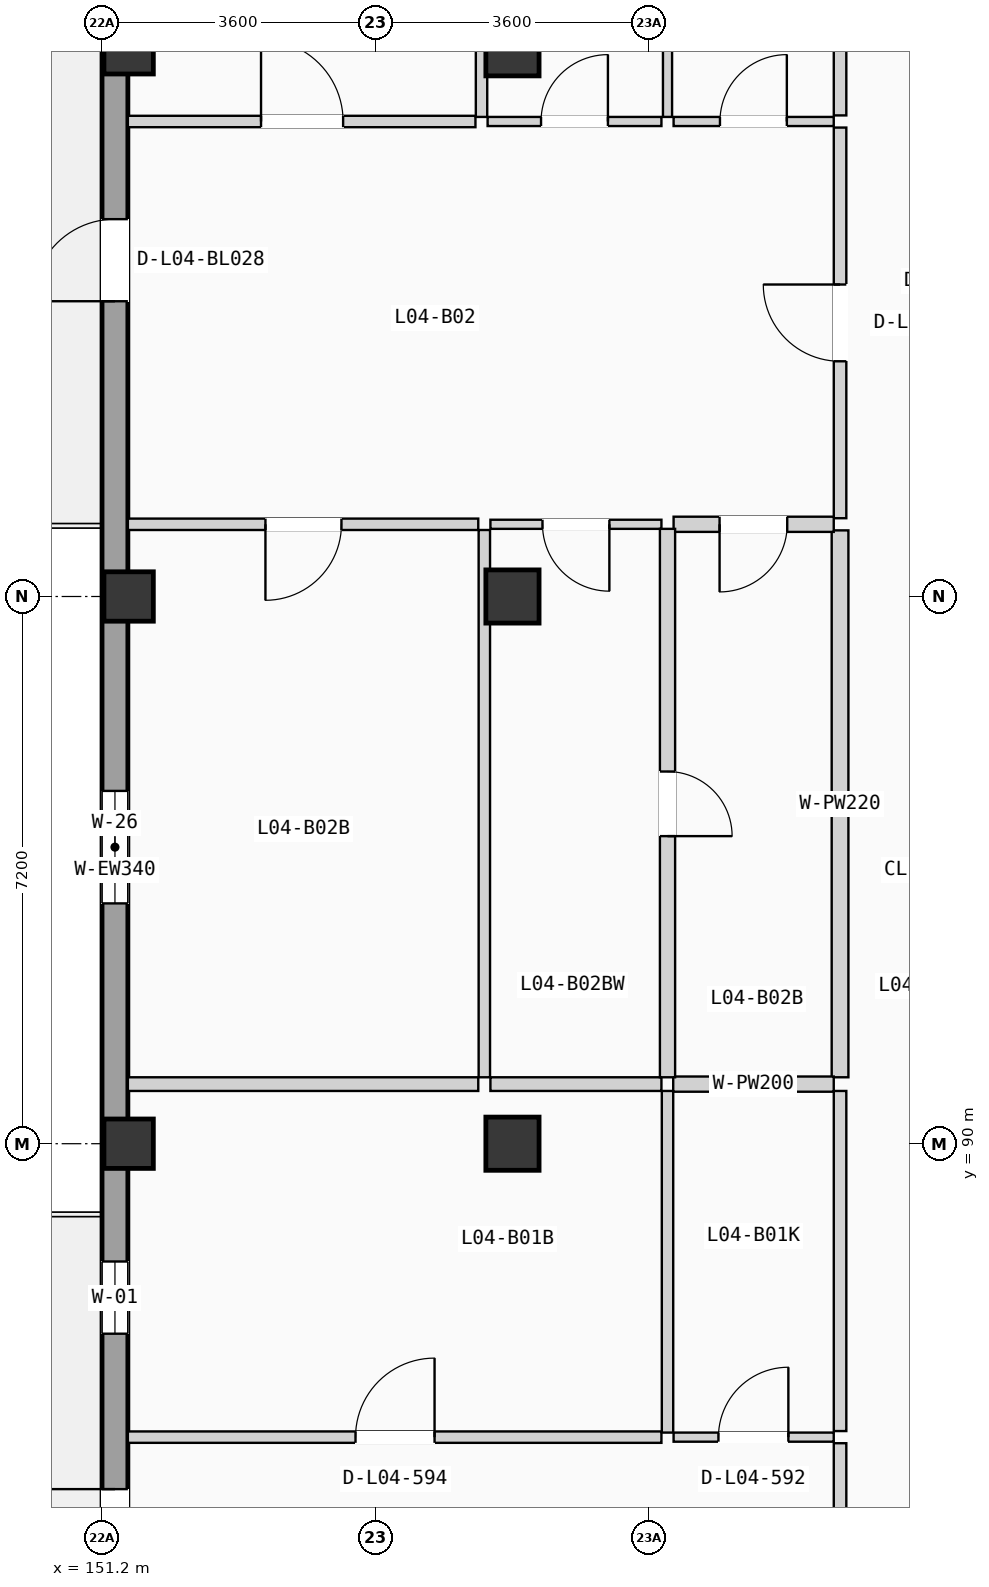
"""IFC4 building model, lengths in metres.
Left out: names, types, materials, properties, quantities, classifications, styles, units other than length and angle.
Written with IfcOpenShell. Run it as: python <this file> out.ifc"""

import sys

from ifc_helpers import new_model, si_unit, direction, frame, frame_2d, origin, origin_2d, place, context, subcontext, project, spatial, rectangle, extrude, element, fill, save


model = new_model("IFC4")
c1 = context("Model", 3, precision=1e-05, world=origin(), true_north=direction((0.0, 1.0)))
c2 = subcontext(c1, "Body", "Model", "MODEL_VIEW")
j1 = project(units=[si_unit("LENGTHUNIT", "METRE"), si_unit("PLANEANGLEUNIT", "RADIAN")], contexts=[c1])
p1 = place(None, origin())
s1 = spatial("IfcSite", under=j1, at=p1, CompositionType="ELEMENT")
p2 = place(p1, origin())
s2 = spatial("IfcBuilding", under=s1, at=p2, CompositionType="ELEMENT")
p3 = place(p2, frame((0.0, 0.0, 15.225)))
s3 = spatial("IfcBuildingStorey", under=s2, at=p3, CompositionType="ELEMENT", Elevation=15.225)
for number, where, z_axis, x_axis in (
    (1, (151.55, 90.0, 0.0), (0.0, 0.0, 1.0), (1.0, 0.0, 0.0)),
    (2, (151.55, 97.2, 0.0), (0.0, 0.0, 1.0), (1.0, 0.0, 0.0)),
    (3, (151.55, 104.4, 0.0), (0.0, 0.0, 1.0), (1.0, 0.0, 0.0)),
):
    element("IfcColumn", number, at=place(p3, frame(where, z_axis=z_axis, x_axis=x_axis)), inside=s3, PredefinedType="COLUMN", context=c2, shape_type="SweptSolid", body=[
        extrude(rectangle(XDim=0.65, YDim=0.65, at=origin_2d()), origin(), (0.0, 0.0, 1.0), 3.15),
    ])
for number, where, z_axis, x_axis in (
    (4, (156.6, 90.0, 0.0), (0.0, 0.0, 1.0), (1.0, 0.0, 0.0)),
    (5, (156.6, 97.2, 0.0), (0.0, 0.0, 1.0), (1.0, 0.0, 0.0)),
    (6, (156.6, 104.4, 0.0), (0.0, 0.0, 1.0), (1.0, 0.0, 0.0)),
):
    element("IfcColumn", number, at=place(p3, frame(where, z_axis=z_axis, x_axis=x_axis)), inside=s3, PredefinedType="COLUMN", context=c2, shape_type="SweptSolid", body=[
        extrude(rectangle(XDim=0.7, YDim=0.7, at=origin_2d()), origin(), (0.0, 0.0, 1.0), 3.15),
    ])
p4 = place(p3, frame((151.37, 68.74, 0.0), z_axis=(0.0, 0.0, 1.0), x_axis=(0.0, 1.0, 0.0)))
e7 = element("IfcWall", 7, at=p4, inside=s3, PredefinedType="SOLIDWALL", context=c2, shape_type="SweptSolid", body=[
    extrude(rectangle(XDim=49.72, YDim=0.34, at=frame_2d((24.86, 0.0))), origin(), (0.0, 0.0, 1.0), 2.89),
])
p5 = place(p4, frame((15.765, 0.0, 0.0)))
e8 = element("IfcOpeningElement", 8, at=p5, cuts=e7, PredefinedType="OPENING", context=c2, shape_type="SweptSolid", body=[
    extrude(rectangle(XDim=0.95, YDim=2.15, at=frame_2d((0.475, 1.075))), frame((0.0, 0.18, 0.0), z_axis=(0.0, -1.0, 0.0), x_axis=(1.0, 0.0, 0.0)), (0.0, 0.0, 1.0), 0.36),
])
p6 = place(p4, frame((8.823, 0.0, 0.555)))
e9 = element("IfcOpeningElement", 9, at=p6, cuts=e7, PredefinedType="OPENING", context=c2, shape_type="SweptSolid", body=[
    extrude(rectangle(XDim=1.35, YDim=1.65, at=frame_2d((0.675, 0.825))), frame((0.0, 0.18, 0.0), z_axis=(0.0, -1.0, 0.0), x_axis=(1.0, 0.0, 0.0)), (0.0, 0.0, 1.0), 0.36),
])
p7 = place(p4, frame((18.76, 0.0, 0.85)))
e10 = element("IfcOpeningElement", 10, at=p7, cuts=e7, PredefinedType="OPENING", context=c2, shape_type="SweptSolid", body=[
    extrude(rectangle(XDim=0.95, YDim=1.2, at=frame_2d((0.475, 0.6))), frame((0.0, 0.18, 0.0), z_axis=(0.0, -1.0, 0.0), x_axis=(1.0, 0.0, 0.0)), (0.0, 0.0, 1.0), 0.36),
])
p8 = place(p4, frame((32.345, 0.0, 0.0)))
e11 = element("IfcOpeningElement", 11, at=p8, cuts=e7, PredefinedType="OPENING", context=c2, shape_type="SweptSolid", body=[
    extrude(rectangle(XDim=1.08, YDim=2.18, at=frame_2d((0.54, 1.09))), frame((0.0, 0.18, 0.0), z_axis=(0.0, -1.0, 0.0), x_axis=(1.0, 0.0, 0.0)), (0.0, 0.0, 1.0), 0.36),
])
p9 = place(p4, frame((24.422, 0.0, 0.9)))
e12 = element("IfcOpeningElement", 12, at=p9, cuts=e7, PredefinedType="OPENING", context=c2, shape_type="SweptSolid", body=[
    extrude(rectangle(XDim=1.48, YDim=1.2, at=frame_2d((0.74, 0.6))), frame((0.0, 0.18, 0.0), z_axis=(0.0, -1.0, 0.0), x_axis=(1.0, 0.0, 0.0)), (0.0, 0.0, 1.0), 0.36),
])
p10 = place(p4, frame((38.455, 0.0, 0.855)))
e13 = element("IfcOpeningElement", 13, at=p10, cuts=e7, PredefinedType="OPENING", context=c2, shape_type="SweptSolid", body=[
    extrude(rectangle(XDim=1.48, YDim=1.35, at=frame_2d((0.74, 0.675))), frame((0.0, 0.18, 0.0), z_axis=(0.0, -1.0, 0.0), x_axis=(1.0, 0.0, 0.0)), (0.0, 0.0, 1.0), 0.36),
])
p11 = place(p3, frame((160.91, 80.635, 0.0), z_axis=(0.0, 0.0, 1.0), x_axis=(0.0, 1.0, 0.0)))
e14 = element("IfcWall", 14, at=p11, inside=s3, PredefinedType="PARTITIONING", context=c2, shape_type="SweptSolid", body=[
    extrude(rectangle(XDim=5.424, YDim=0.165, at=frame_2d((2.712, 0.0))), origin(), (0.0, 0.0, 1.0), 2.87),
])
p12 = place(p11, frame((2.207, 0.0, 0.0)))
e15 = element("IfcOpeningElement", 15, at=p12, cuts=e14, PredefinedType="OPENING", context=c2, shape_type="SweptSolid", body=[
    extrude(rectangle(XDim=1.01, YDim=2.11, at=frame_2d((0.505, 1.055))), frame((0.0, 0.093, 0.0), z_axis=(0.0, -1.0, 0.0), x_axis=(1.0, 0.0, 0.0)), (0.0, 0.0, 1.0), 0.185),
])
p13 = place(p3, frame((160.91, 86.219, 0.0), z_axis=(0.0, 0.0, 1.0), x_axis=(0.0, 1.0, 0.0)))
e16 = element("IfcWall", 16, at=p13, inside=s3, PredefinedType="PARTITIONING", context=c2, shape_type="SweptSolid", body=[
    extrude(rectangle(XDim=4.475, YDim=0.165, at=frame_2d((2.238, 0.0))), origin(), (0.0, 0.0, 1.0), 2.87),
])
p14 = place(p3, frame((160.91, 98.23, 0.0), z_axis=(0.0, 0.0, 1.0), x_axis=(0.0, 1.0, 0.0)))
e17 = element("IfcWall", 17, at=p14, inside=s3, PredefinedType="PARTITIONING", context=c2, shape_type="SweptSolid", body=[
    extrude(rectangle(XDim=5.14, YDim=0.165, at=frame_2d((2.57, 0.0))), origin(), (0.0, 0.0, 1.0), 2.87),
])
p15 = place(p14, frame((2.065, 0.0, 0.0)))
e18 = element("IfcOpeningElement", 18, at=p15, cuts=e17, PredefinedType="OPENING", context=c2, shape_type="SweptSolid", body=[
    extrude(rectangle(XDim=1.01, YDim=2.11, at=frame_2d((0.505, 1.055))), frame((0.0, 0.093, 0.0), z_axis=(0.0, -1.0, 0.0), x_axis=(1.0, 0.0, 0.0)), (0.0, 0.0, 1.0), 0.185),
])
p16 = place(p3, frame((160.91, 90.874, 0.0), z_axis=(0.0, 0.0, 1.0), x_axis=(0.0, 1.0, 0.0)))
e19 = element("IfcWall", 19, at=p16, inside=s3, PredefinedType="PLUMBINGWALL", context=c2, shape_type="SweptSolid", body=[
    extrude(rectangle(XDim=7.196, YDim=0.22, at=frame_2d((3.598, 0.0))), origin(), (0.0, 0.0, 1.0), 2.87),
])
p17 = place(p3, frame((160.91, 103.53, 0.0), z_axis=(0.0, 0.0, 1.0), x_axis=(0.0, 1.0, 0.0)))
e20 = element("IfcWall", 20, at=p17, inside=s3, PredefinedType="PARTITIONING", context=c2, shape_type="SweptSolid", body=[
    extrude(rectangle(XDim=7.67, YDim=0.165, at=frame_2d((3.835, 0.0))), origin(), (0.0, 0.0, 1.0), 2.87),
])
p18 = place(p3, frame((158.72, 86.139, 0.0), z_axis=(0.0, 0.0, 1.0), x_axis=(1.0, 0.0, 0.0)))
e21 = element("IfcWall", 21, at=p18, inside=s3, PredefinedType="PARTITIONING", context=c2, shape_type="SweptSolid", body=[
    extrude(rectangle(XDim=2.107, YDim=0.12, at=frame_2d((1.053, 0.0))), origin(), (0.0, 0.0, 1.0), 2.87),
])
p19 = place(p18, frame((0.59, 0.0, 0.0)))
e22 = element("IfcOpeningElement", 22, at=p19, cuts=e21, PredefinedType="OPENING", context=c2, shape_type="SweptSolid", body=[
    extrude(rectangle(XDim=0.92, YDim=2.02, at=frame_2d((0.46, 1.01))), frame((0.0, 0.07, 0.0), z_axis=(0.0, -1.0, 0.0), x_axis=(1.0, 0.0, 0.0)), (0.0, 0.0, 1.0), 0.14),
])
p20 = place(p3, frame((151.54, 86.139, 0.0), z_axis=(0.0, 0.0, 1.0), x_axis=(1.0, 0.0, 0.0)))
e23 = element("IfcWall", 23, at=p20, inside=s3, PredefinedType="PARTITIONING", context=c2, shape_type="SweptSolid", body=[
    extrude(rectangle(XDim=7.02, YDim=0.15, at=frame_2d((3.51, 0.0))), origin(), (0.0, 0.0, 1.0), 2.87),
])
p21 = place(p20, frame((2.995, 0.0, 0.0)))
e24 = element("IfcOpeningElement", 24, at=p21, cuts=e23, PredefinedType="OPENING", context=c2, shape_type="SweptSolid", body=[
    extrude(rectangle(XDim=1.04, YDim=2.08, at=frame_2d((0.52, 1.04))), frame((0.0, 0.085, 0.0), z_axis=(0.0, -1.0, 0.0), x_axis=(1.0, 0.0, 0.0)), (0.0, 0.0, 1.0), 0.17),
])
p22 = place(p3, frame((158.64, 86.199, 0.0), z_axis=(0.0, 0.0, 1.0), x_axis=(0.0, 1.0, 0.0)))
e25 = element("IfcWall", 25, at=p22, inside=s3, PredefinedType="PARTITIONING", context=c2, shape_type="SweptSolid", body=[
    extrude(rectangle(XDim=4.495, YDim=0.15, at=frame_2d((2.248, 0.0))), origin(), (0.0, 0.0, 1.0), 2.87),
])
p23 = place(p3, frame((158.715, 90.784, 0.0), z_axis=(0.0, 0.0, 1.0), x_axis=(1.0, 0.0, 0.0)))
e26 = element("IfcWall", 26, at=p23, inside=s3, PredefinedType="PLUMBINGWALL", context=c2, shape_type="SweptSolid", body=[
    extrude(rectangle(XDim=2.112, YDim=0.2, at=frame_2d((1.056, 0.0))), origin(), (0.0, 0.0, 1.0), 2.87),
])
p24 = place(p3, frame((151.54, 90.784, 0.0), z_axis=(0.0, 0.0, 1.0), x_axis=(1.0, 0.0, 0.0)))
e27 = element("IfcWall", 27, at=p24, inside=s3, PredefinedType="PARTITIONING", context=c2, shape_type="SweptSolid", body=[
    extrude(rectangle(XDim=4.61, YDim=0.18, at=frame_2d((2.305, 0.0))), origin(), (0.0, 0.0, 1.0), 2.87),
])
p25 = place(p3, frame((156.31, 90.784, 0.0), z_axis=(0.0, 0.0, 1.0), x_axis=(1.0, 0.0, 0.0)))
e28 = element("IfcWall", 28, at=p25, inside=s3, PredefinedType="PARTITIONING", context=c2, shape_type="SweptSolid", body=[
    extrude(rectangle(XDim=2.25, YDim=0.18, at=frame_2d((1.125, 0.0))), origin(), (0.0, 0.0, 1.0), 2.87),
])
p26 = place(p3, frame((158.72, 98.15, 0.0), z_axis=(0.0, 0.0, 1.0), x_axis=(1.0, 0.0, 0.0)))
e29 = element("IfcWall", 29, at=p26, inside=s3, PredefinedType="PLUMBINGWALL", context=c2, shape_type="SweptSolid", body=[
    extrude(rectangle(XDim=2.107, YDim=0.2, at=frame_2d((1.053, 0.0))), origin(), (0.0, 0.0, 1.0), 2.87),
])
p27 = place(p26, frame((0.605, 0.0, 0.0)))
e30 = element("IfcOpeningElement", 30, at=p27, cuts=e29, PredefinedType="OPENING", context=c2, shape_type="SweptSolid", body=[
    extrude(rectangle(XDim=0.89, YDim=2.03, at=frame_2d((0.445, 1.015))), frame((0.0, 0.11, 0.0), z_axis=(0.0, -1.0, 0.0), x_axis=(1.0, 0.0, 0.0)), (0.0, 0.0, 1.0), 0.22),
])
p28 = place(p3, frame((158.72, 103.45, 0.0), z_axis=(0.0, 0.0, 1.0), x_axis=(1.0, 0.0, 0.0)))
e31 = element("IfcWall", 31, at=p28, inside=s3, PredefinedType="PARTITIONING", context=c2, shape_type="SweptSolid", body=[
    extrude(rectangle(XDim=2.107, YDim=0.12, at=frame_2d((1.053, 0.0))), origin(), (0.0, 0.0, 1.0), 2.87),
])
p29 = place(p28, frame((0.61, 0.0, 0.0)))
e32 = element("IfcOpeningElement", 32, at=p29, cuts=e31, PredefinedType="OPENING", context=c2, shape_type="SweptSolid", body=[
    extrude(rectangle(XDim=0.88, YDim=2.02, at=frame_2d((0.44, 1.01))), frame((0.0, 0.07, 0.0), z_axis=(0.0, -1.0, 0.0), x_axis=(1.0, 0.0, 0.0)), (0.0, 0.0, 1.0), 0.14),
])
p30 = place(p3, frame((151.54, 98.15, 0.0), z_axis=(0.0, 0.0, 1.0), x_axis=(1.0, 0.0, 0.0)))
e33 = element("IfcWall", 33, at=p30, inside=s3, PredefinedType="PARTITIONING", context=c2, shape_type="SweptSolid", body=[
    extrude(rectangle(XDim=4.61, YDim=0.15, at=frame_2d((2.305, 0.0))), origin(), (0.0, 0.0, 1.0), 2.87),
])
p31 = place(p30, frame((1.81, 0.0, 0.0)))
e34 = element("IfcOpeningElement", 34, at=p31, cuts=e33, PredefinedType="OPENING", context=c2, shape_type="SweptSolid", body=[
    extrude(rectangle(XDim=1.0, YDim=2.06, at=frame_2d((0.5, 1.03))), frame((0.0, 0.085, 0.0), z_axis=(0.0, -1.0, 0.0), x_axis=(1.0, 0.0, 0.0)), (0.0, 0.0, 1.0), 0.17),
])
p32 = place(p3, frame((156.31, 98.15, 0.0), z_axis=(0.0, 0.0, 1.0), x_axis=(1.0, 0.0, 0.0)))
e35 = element("IfcWall", 35, at=p32, inside=s3, PredefinedType="PARTITIONING", context=c2, shape_type="SweptSolid", body=[
    extrude(rectangle(XDim=2.25, YDim=0.12, at=frame_2d((1.125, 0.0))), origin(), (0.0, 0.0, 1.0), 2.87),
])
p33 = place(p32, frame((0.685, 0.0, 0.0)))
e36 = element("IfcOpeningElement", 36, at=p33, cuts=e35, PredefinedType="OPENING", context=c2, shape_type="SweptSolid", body=[
    extrude(rectangle(XDim=0.88, YDim=2.02, at=frame_2d((0.44, 1.01))), frame((0.0, 0.07, 0.0), z_axis=(0.0, -1.0, 0.0), x_axis=(1.0, 0.0, 0.0)), (0.0, 0.0, 1.0), 0.14),
])
p34 = place(p3, frame((151.54, 103.45, 0.0), z_axis=(0.0, 0.0, 1.0), x_axis=(1.0, 0.0, 0.0)))
e37 = element("IfcWall", 37, at=p34, inside=s3, PredefinedType="PARTITIONING", context=c2, shape_type="SweptSolid", body=[
    extrude(rectangle(XDim=4.573, YDim=0.15, at=frame_2d((2.287, 0.0))), origin(), (0.0, 0.0, 1.0), 2.87),
])
p35 = place(p34, frame((1.752, 0.0, 0.0)))
e38 = element("IfcOpeningElement", 38, at=p35, cuts=e37, PredefinedType="OPENING", context=c2, shape_type="SweptSolid", body=[
    extrude(rectangle(XDim=1.08, YDim=2.1, at=frame_2d((0.54, 1.05))), frame((0.0, 0.085, 0.0), z_axis=(0.0, -1.0, 0.0), x_axis=(1.0, 0.0, 0.0)), (0.0, 0.0, 1.0), 0.17),
])
p36 = place(p3, frame((156.273, 103.45, 0.0), z_axis=(0.0, 0.0, 1.0), x_axis=(1.0, 0.0, 0.0)))
e39 = element("IfcWall", 39, at=p36, inside=s3, PredefinedType="PARTITIONING", context=c2, shape_type="SweptSolid", body=[
    extrude(rectangle(XDim=2.287, YDim=0.12, at=frame_2d((1.144, 0.0))), origin(), (0.0, 0.0, 1.0), 2.87),
])
p37 = place(p36, frame((0.703, 0.0, 0.0)))
e40 = element("IfcOpeningElement", 40, at=p37, cuts=e39, PredefinedType="OPENING", context=c2, shape_type="SweptSolid", body=[
    extrude(rectangle(XDim=0.88, YDim=2.02, at=frame_2d((0.44, 1.01))), frame((0.0, 0.07, 0.0), z_axis=(0.0, -1.0, 0.0), x_axis=(1.0, 0.0, 0.0)), (0.0, 0.0, 1.0), 0.14),
])
p38 = place(p3, frame((158.64, 90.874, 0.0), z_axis=(0.0, 0.0, 1.0), x_axis=(0.0, 1.0, 0.0)))
e41 = element("IfcWall", 41, at=p38, inside=s3, PredefinedType="PLUMBINGWALL", context=c2, shape_type="SweptSolid", body=[
    extrude(rectangle(XDim=7.216, YDim=0.2, at=frame_2d((3.608, 0.0))), origin(), (0.0, 0.0, 1.0), 2.87),
])
p39 = place(p38, frame((3.173, 0.0, 0.0)))
e42 = element("IfcOpeningElement", 42, at=p39, cuts=e41, PredefinedType="OPENING", context=c2, shape_type="SweptSolid", body=[
    extrude(rectangle(XDim=0.85, YDim=2.01, at=frame_2d((0.425, 1.005))), frame((0.0, 0.11, 0.0), z_axis=(0.0, -1.0, 0.0), x_axis=(1.0, 0.0, 0.0)), (0.0, 0.0, 1.0), 0.22),
])
p40 = place(p3, frame((158.64, 103.51, 0.0), z_axis=(0.0, 0.0, 1.0), x_axis=(0.0, 1.0, 0.0)))
e43 = element("IfcWall", 43, at=p40, inside=s3, PredefinedType="PARTITIONING", context=c2, shape_type="SweptSolid", body=[
    extrude(rectangle(XDim=7.69, YDim=0.12, at=frame_2d((3.845, 0.0))), origin(), (0.0, 0.0, 1.0), 2.87),
])
p41 = place(p3, frame((156.23, 90.874, 0.0), z_axis=(0.0, 0.0, 1.0), x_axis=(0.0, 1.0, 0.0)))
e44 = element("IfcWall", 44, at=p41, inside=s3, PredefinedType="PARTITIONING", context=c2, shape_type="SweptSolid", body=[
    extrude(rectangle(XDim=7.201, YDim=0.15, at=frame_2d((3.601, 0.0))), origin(), (0.0, 0.0, 1.0), 2.87),
])
p42 = place(p3, frame((156.193, 103.51, 0.0), z_axis=(0.0, 0.0, 1.0), x_axis=(0.0, 1.0, 0.0)))
e45 = element("IfcWall", 45, at=p42, inside=s3, PredefinedType="PARTITIONING", context=c2, shape_type="SweptSolid", body=[
    extrude(rectangle(XDim=7.69, YDim=0.15, at=frame_2d((3.845, 0.0))), origin(), (0.0, 0.0, 1.0), 2.87),
])
p43 = place(p5, origin())
e46 = element("IfcDoor", 46, at=p43, inside=s3, OperationType="SINGLE_SWING_RIGHT", PredefinedType="DOOR", context=c2, shape_type="SweptSolid", body=[
    extrude(rectangle(XDim=0.95, YDim=2.15, at=frame_2d((0.475, 1.075))), frame((0.0, 0.025, 0.0), z_axis=(0.0, -1.0, 0.0), x_axis=(1.0, 0.0, 0.0)), (0.0, 0.0, 1.0), 0.05),
])
fill(e8, e46)
p44 = place(p7, origin())
e47 = element("IfcWindow", 47, at=p44, inside=s3, PartitioningType="SINGLE_PANEL", PredefinedType="WINDOW", context=c2, shape_type="SweptSolid", body=[
    extrude(rectangle(XDim=0.95, YDim=1.2, at=frame_2d((0.475, 0.6))), frame((0.0, 0.03, 0.0), z_axis=(0.0, -1.0, 0.0), x_axis=(1.0, 0.0, 0.0)), (0.0, 0.0, 1.0), 0.06),
])
fill(e10, e47)
p45 = place(p8, origin())
e48 = element("IfcDoor", 48, at=p45, inside=s3, OperationType="SINGLE_SWING_LEFT", PredefinedType="DOOR", context=c2, shape_type="SweptSolid", body=[
    extrude(rectangle(XDim=1.08, YDim=2.18, at=frame_2d((0.54, 1.09))), frame((0.0, 0.025, 0.0), z_axis=(0.0, -1.0, 0.0), x_axis=(1.0, 0.0, 0.0)), (0.0, 0.0, 1.0), 0.05),
])
fill(e11, e48)
p46 = place(p9, origin())
e49 = element("IfcWindow", 49, at=p46, inside=s3, PartitioningType="SINGLE_PANEL", PredefinedType="WINDOW", context=c2, shape_type="SweptSolid", body=[
    extrude(rectangle(XDim=1.48, YDim=1.2, at=frame_2d((0.74, 0.6))), frame((0.0, 0.03, 0.0), z_axis=(0.0, -1.0, 0.0), x_axis=(1.0, 0.0, 0.0)), (0.0, 0.0, 1.0), 0.06),
])
fill(e12, e49)
p47 = place(p15, origin())
e50 = element("IfcDoor", 50, at=p47, inside=s3, OperationType="SINGLE_SWING_RIGHT", PredefinedType="DOOR", context=c2, shape_type="SweptSolid", body=[
    extrude(rectangle(XDim=1.01, YDim=2.11, at=frame_2d((0.505, 1.055))), frame((0.0, 0.025, 0.0), z_axis=(0.0, -1.0, 0.0), x_axis=(1.0, 0.0, 0.0)), (0.0, 0.0, 1.0), 0.05),
])
fill(e18, e50)
p48 = place(p19, origin())
e51 = element("IfcDoor", 51, at=p48, inside=s3, OperationType="SINGLE_SWING_RIGHT", PredefinedType="DOOR", context=c2, shape_type="SweptSolid", body=[
    extrude(rectangle(XDim=0.92, YDim=2.02, at=frame_2d((0.46, 1.01))), frame((0.0, 0.025, 0.0), z_axis=(0.0, -1.0, 0.0), x_axis=(1.0, 0.0, 0.0)), (0.0, 0.0, 1.0), 0.05),
])
fill(e22, e51)
p49 = place(p21, origin())
e52 = element("IfcDoor", 52, at=p49, inside=s3, OperationType="SINGLE_SWING_RIGHT", PredefinedType="DOOR", context=c2, shape_type="SweptSolid", body=[
    extrude(rectangle(XDim=1.04, YDim=2.08, at=frame_2d((0.52, 1.04))), frame((0.0, 0.025, 0.0), z_axis=(0.0, -1.0, 0.0), x_axis=(1.0, 0.0, 0.0)), (0.0, 0.0, 1.0), 0.05),
])
fill(e24, e52)
p50 = place(p27, frame((0.89, 0.0, 0.0), z_axis=(0.0, 0.0, 1.0), x_axis=(-1.0, 0.0, 0.0)))
e53 = element("IfcDoor", 53, at=p50, inside=s3, OperationType="SINGLE_SWING_LEFT", PredefinedType="DOOR", context=c2, shape_type="SweptSolid", body=[
    extrude(rectangle(XDim=0.89, YDim=2.03, at=frame_2d((0.445, 1.015))), frame((0.0, 0.025, 0.0), z_axis=(0.0, -1.0, 0.0), x_axis=(1.0, 0.0, 0.0)), (0.0, 0.0, 1.0), 0.05),
])
fill(e30, e53)
p51 = place(p29, origin())
e54 = element("IfcDoor", 54, at=p51, inside=s3, OperationType="SINGLE_SWING_RIGHT", PredefinedType="DOOR", context=c2, shape_type="SweptSolid", body=[
    extrude(rectangle(XDim=0.88, YDim=2.02, at=frame_2d((0.44, 1.01))), frame((0.0, 0.025, 0.0), z_axis=(0.0, -1.0, 0.0), x_axis=(1.0, 0.0, 0.0)), (0.0, 0.0, 1.0), 0.05),
])
fill(e32, e54)
p52 = place(p31, frame((1.0, 0.0, 0.0), z_axis=(0.0, 0.0, 1.0), x_axis=(-1.0, 0.0, 0.0)))
e55 = element("IfcDoor", 55, at=p52, inside=s3, OperationType="SINGLE_SWING_LEFT", PredefinedType="DOOR", context=c2, shape_type="SweptSolid", body=[
    extrude(rectangle(XDim=1.0, YDim=2.06, at=frame_2d((0.5, 1.03))), frame((0.0, 0.025, 0.0), z_axis=(0.0, -1.0, 0.0), x_axis=(1.0, 0.0, 0.0)), (0.0, 0.0, 1.0), 0.05),
])
fill(e34, e55)
p53 = place(p33, frame((0.88, 0.0, 0.0), z_axis=(0.0, 0.0, 1.0), x_axis=(-1.0, 0.0, 0.0)))
e56 = element("IfcDoor", 56, at=p53, inside=s3, OperationType="SINGLE_SWING_RIGHT", PredefinedType="DOOR", context=c2, shape_type="SweptSolid", body=[
    extrude(rectangle(XDim=0.88, YDim=2.02, at=frame_2d((0.44, 1.01))), frame((0.0, 0.025, 0.0), z_axis=(0.0, -1.0, 0.0), x_axis=(1.0, 0.0, 0.0)), (0.0, 0.0, 1.0), 0.05),
])
fill(e36, e56)
p54 = place(p35, origin())
e57 = element("IfcDoor", 57, at=p54, inside=s3, OperationType="SINGLE_SWING_LEFT", PredefinedType="DOOR", context=c2, shape_type="SweptSolid", body=[
    extrude(rectangle(XDim=1.08, YDim=2.1, at=frame_2d((0.54, 1.05))), frame((0.0, 0.025, 0.0), z_axis=(0.0, -1.0, 0.0), x_axis=(1.0, 0.0, 0.0)), (0.0, 0.0, 1.0), 0.05),
])
fill(e38, e57)
p55 = place(p37, origin())
e58 = element("IfcDoor", 58, at=p55, inside=s3, OperationType="SINGLE_SWING_RIGHT", PredefinedType="DOOR", context=c2, shape_type="SweptSolid", body=[
    extrude(rectangle(XDim=0.88, YDim=2.02, at=frame_2d((0.44, 1.01))), frame((0.0, 0.025, 0.0), z_axis=(0.0, -1.0, 0.0), x_axis=(1.0, 0.0, 0.0)), (0.0, 0.0, 1.0), 0.05),
])
fill(e40, e58)
p56 = place(p39, frame((0.85, 0.0, 0.0), z_axis=(0.0, 0.0, 1.0), x_axis=(-1.0, 0.0, 0.0)))
e59 = element("IfcDoor", 59, at=p56, inside=s3, OperationType="SINGLE_SWING_LEFT", PredefinedType="DOOR", context=c2, shape_type="SweptSolid", body=[
    extrude(rectangle(XDim=0.85, YDim=2.01, at=frame_2d((0.425, 1.005))), frame((0.0, 0.025, 0.0), z_axis=(0.0, -1.0, 0.0), x_axis=(1.0, 0.0, 0.0)), (0.0, 0.0, 1.0), 0.05),
])
fill(e42, e59)
save(model, sys.argv[1])
